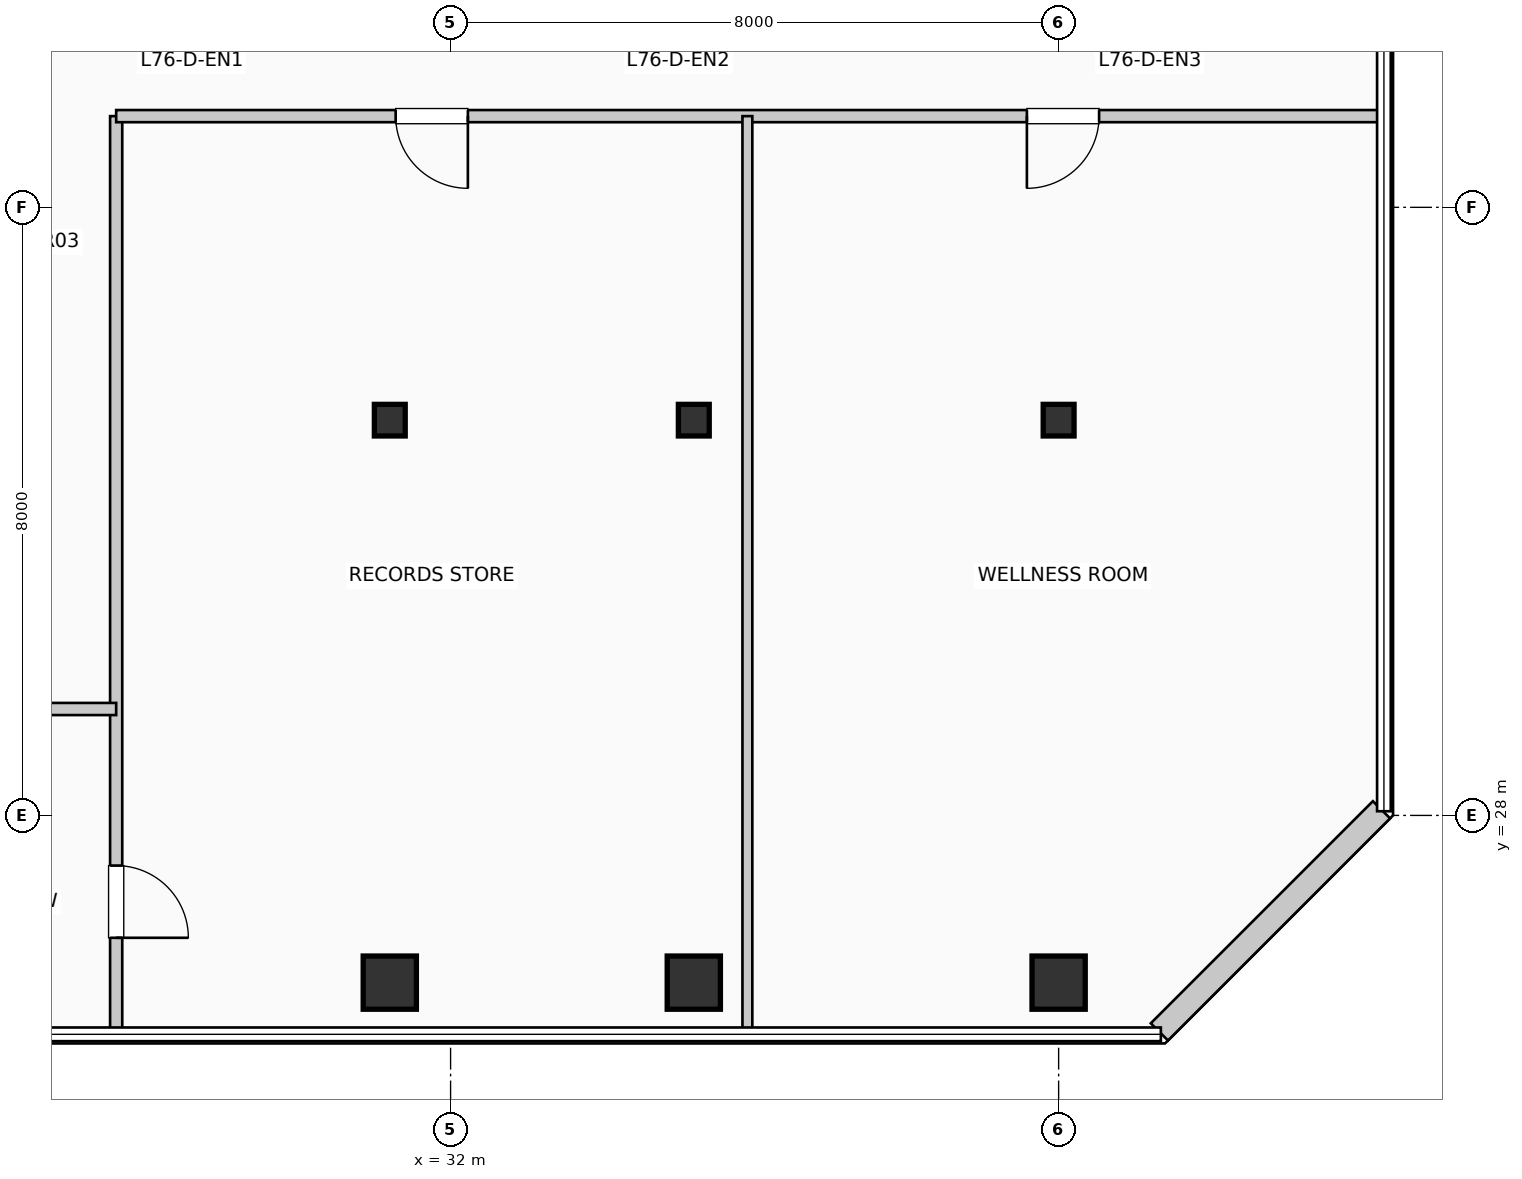
"""IFC4 building model, lengths in metres.
Left out: names, types, materials, properties, quantities, classifications, styles, units other than length and angle.
Written with IfcOpenShell. Run it as: python <this file> out.ifc"""

import sys

from ifc_helpers import new_model, si_unit, direction, frame, frame_2d, origin, origin_2d, place, context, subcontext, project, spatial, rectangle, i_section, extrude, element, fill, save


model = new_model("IFC4")
c1 = context("Model", 3, precision=1e-05, world=origin(), true_north=direction((0.0, 1.0)))
c2 = subcontext(c1, "Body", "Model", "MODEL_VIEW")
j1 = project(units=[si_unit("LENGTHUNIT", "METRE"), si_unit("PLANEANGLEUNIT", "RADIAN")], contexts=[c1])
p1 = place(None, origin())
s1 = spatial("IfcSite", under=j1, at=p1, CompositionType="ELEMENT")
p2 = place(p1, origin())
s2 = spatial("IfcBuilding", under=s1, at=p2, CompositionType="ELEMENT")
p3 = place(p2, frame((0.0, 0.0, 311.85)))
s3 = spatial("IfcBuildingStorey", under=s2, at=p3, CompositionType="ELEMENT", Elevation=311.85)
p4 = place(p3, frame((31.2, 25.8, 0.0), z_axis=(0.0, 0.0, 1.0), x_axis=(1.0, 0.0, 0.0)))
e1 = element("IfcColumn", 1, at=p4, inside=s3, PredefinedType="COLUMN", context=c2, shape_type="SweptSolid", body=[
    extrude(rectangle(XDim=0.7, YDim=0.7, at=origin_2d()), origin(), (0.0, 0.0, 1.0), 3.96),
])
p5 = place(p3, frame((31.2, 33.2, 0.0), z_axis=(0.0, 0.0, 1.0), x_axis=(1.0, 0.0, 0.0)))
e2 = element("IfcColumn", 2, at=p5, inside=s3, PredefinedType="COLUMN", context=c2, shape_type="SweptSolid", body=[
    extrude(i_section(OverallWidth=0.406, OverallDepth=0.416, WebThickness=0.022, FlangeThickness=0.036, at=origin_2d()), origin(), (0.0, 0.0, 1.0), 3.96),
])
p6 = place(p3, frame((35.2, 25.8, 0.0), z_axis=(0.0, 0.0, 1.0), x_axis=(1.0, 0.0, 0.0)))
e3 = element("IfcColumn", 3, at=p6, inside=s3, PredefinedType="COLUMN", context=c2, shape_type="SweptSolid", body=[
    extrude(rectangle(XDim=0.7, YDim=0.7, at=origin_2d()), origin(), (0.0, 0.0, 1.0), 3.96),
])
p7 = place(p3, frame((35.2, 33.2, 0.0), z_axis=(0.0, 0.0, 1.0), x_axis=(1.0, 0.0, 0.0)))
e4 = element("IfcColumn", 4, at=p7, inside=s3, PredefinedType="COLUMN", context=c2, shape_type="SweptSolid", body=[
    extrude(i_section(OverallWidth=0.406, OverallDepth=0.416, WebThickness=0.022, FlangeThickness=0.036, at=origin_2d()), origin(), (0.0, 0.0, 1.0), 3.96),
])
p8 = place(p3, frame((40.0, 25.8, 0.0), z_axis=(0.0, 0.0, 1.0), x_axis=(1.0, 0.0, 0.0)))
e5 = element("IfcColumn", 5, at=p8, inside=s3, PredefinedType="COLUMN", context=c2, shape_type="SweptSolid", body=[
    extrude(rectangle(XDim=0.7, YDim=0.7, at=origin_2d()), origin(), (0.0, 0.0, 1.0), 3.96),
])
p9 = place(p3, frame((40.0, 33.2, 0.0), z_axis=(0.0, 0.0, 1.0), x_axis=(1.0, 0.0, 0.0)))
e6 = element("IfcColumn", 6, at=p9, inside=s3, PredefinedType="COLUMN", context=c2, shape_type="SweptSolid", body=[
    extrude(i_section(OverallWidth=0.406, OverallDepth=0.416, WebThickness=0.022, FlangeThickness=0.036, at=origin_2d()), origin(), (0.0, 0.0, 1.0), 3.96),
])
p10 = place(p3, frame((41.326, 25.152, 0.0), z_axis=(0.0, 0.0, 1.0), x_axis=(0.707136318428, 0.707077242712, 0.0)))
e7 = element("IfcWall", 7, at=p10, inside=s3, PredefinedType="SOLIDWALL", context=c2, shape_type="SweptSolid", body=[
    extrude(rectangle(XDim=4.133, YDim=0.32, at=frame_2d((2.066, 0.0))), origin(), (0.0, 0.0, 1.0), 3.74),
])
p11 = place(p3, frame((27.6, 25.19, 0.0), z_axis=(0.0, 0.0, 1.0), x_axis=(0.0, 1.0, 0.0)))
e8 = element("IfcWall", 8, at=p11, inside=s3, PredefinedType="PARTITIONING", context=c2, shape_type="SweptSolid", body=[
    extrude(rectangle(XDim=12.01, YDim=0.16, at=frame_2d((6.005, 0.0))), origin(), (0.0, 0.0, 1.0), 3.74),
])
p12 = place(p11, frame((2.15, 0.0, 0.0), z_axis=(0.0, 0.0, 1.0), x_axis=(-1.0, 0.0, 0.0)))
e9 = element("IfcOpeningElement", 9, at=p12, cuts=e8, PredefinedType="OPENING", context=c2, shape_type="SweptSolid", body=[
    extrude(rectangle(XDim=0.95, YDim=2.15, at=frame_2d((0.475, 1.075))), frame((0.0, 0.09, 0.0), z_axis=(0.0, -1.0, 0.0), x_axis=(1.0, 0.0, 0.0)), (0.0, 0.0, 1.0), 0.18),
])
p13 = place(p3, frame((23.45, 29.4, 0.0), z_axis=(0.0, 0.0, 1.0), x_axis=(1.0, 0.0, 0.0)))
e10 = element("IfcWall", 10, at=p13, inside=s3, PredefinedType="PARTITIONING", context=c2, shape_type="SweptSolid", body=[
    extrude(rectangle(XDim=4.15, YDim=0.16, at=frame_2d((2.075, 0.0))), origin(), (0.0, 0.0, 1.0), 3.425),
])
p14 = place(p3, frame((27.6, 37.2, 0.0), z_axis=(0.0, 0.0, 1.0), x_axis=(1.0, 0.0, 0.0)))
e11 = element("IfcWall", 11, at=p14, inside=s3, PredefinedType="PARTITIONING", context=c2, shape_type="SweptSolid", body=[
    extrude(rectangle(XDim=16.61, YDim=0.16, at=frame_2d((8.305, 0.0))), origin(), (0.0, 0.0, 1.0), 3.74),
])
p15 = place(p14, frame((4.627, 0.0, 0.0), z_axis=(0.0, 0.0, 1.0), x_axis=(-1.0, 0.0, 0.0)))
e12 = element("IfcOpeningElement", 12, at=p15, cuts=e11, PredefinedType="OPENING", context=c2, shape_type="SweptSolid", body=[
    extrude(rectangle(XDim=0.95, YDim=2.15, at=frame_2d((0.475, 1.075))), frame((0.0, 0.09, 0.0), z_axis=(0.0, -1.0, 0.0), x_axis=(1.0, 0.0, 0.0)), (0.0, 0.0, 1.0), 0.18),
])
p16 = place(p14, frame((12.932, 0.0, 0.0), z_axis=(0.0, 0.0, 1.0), x_axis=(-1.0, 0.0, 0.0)))
e13 = element("IfcOpeningElement", 13, at=p16, cuts=e11, PredefinedType="OPENING", context=c2, shape_type="SweptSolid", body=[
    extrude(rectangle(XDim=0.95, YDim=2.15, at=frame_2d((0.475, 1.075))), frame((0.0, 0.09, 0.0), z_axis=(0.0, -1.0, 0.0), x_axis=(1.0, 0.0, 0.0)), (0.0, 0.0, 1.0), 0.18),
])
p17 = place(p3, frame((35.905, 25.19, 0.0), z_axis=(0.0, 0.0, 1.0), x_axis=(0.0, 1.0, 0.0)))
e14 = element("IfcWall", 14, at=p17, inside=s3, PredefinedType="PARTITIONING", context=c2, shape_type="SweptSolid", body=[
    extrude(rectangle(XDim=12.01, YDim=0.13, at=frame_2d((6.005, 0.0))), origin(), (0.0, 0.0, 1.0), 3.74),
])
p18 = place(p12, origin())
e15 = element("IfcDoor", 15, at=p18, inside=s3, OperationType="SINGLE_SWING_LEFT", PredefinedType="DOOR", context=c2, shape_type="SweptSolid", body=[
    extrude(rectangle(XDim=0.95, YDim=2.15, at=frame_2d((0.475, 1.075))), frame((0.0, 0.025, 0.0), z_axis=(0.0, -1.0, 0.0), x_axis=(1.0, 0.0, 0.0)), (0.0, 0.0, 1.0), 0.05),
])
fill(e9, e15)
p19 = place(p15, origin())
e16 = element("IfcDoor", 16, at=p19, inside=s3, OperationType="SINGLE_SWING_RIGHT", PredefinedType="DOOR", context=c2, shape_type="SweptSolid", body=[
    extrude(rectangle(XDim=0.95, YDim=2.15, at=frame_2d((0.475, 1.075))), frame((0.0, 0.025, 0.0), z_axis=(0.0, -1.0, 0.0), x_axis=(1.0, 0.0, 0.0)), (0.0, 0.0, 1.0), 0.05),
])
fill(e12, e16)
p20 = place(p16, origin())
e17 = element("IfcDoor", 17, at=p20, inside=s3, OperationType="SINGLE_SWING_LEFT", PredefinedType="DOOR", context=c2, shape_type="SweptSolid", body=[
    extrude(rectangle(XDim=0.95, YDim=2.15, at=frame_2d((0.475, 1.075))), frame((0.0, 0.025, 0.0), z_axis=(0.0, -1.0, 0.0), x_axis=(1.0, 0.0, 0.0)), (0.0, 0.0, 1.0), 0.05),
])
fill(e13, e17)
save(model, sys.argv[1])
